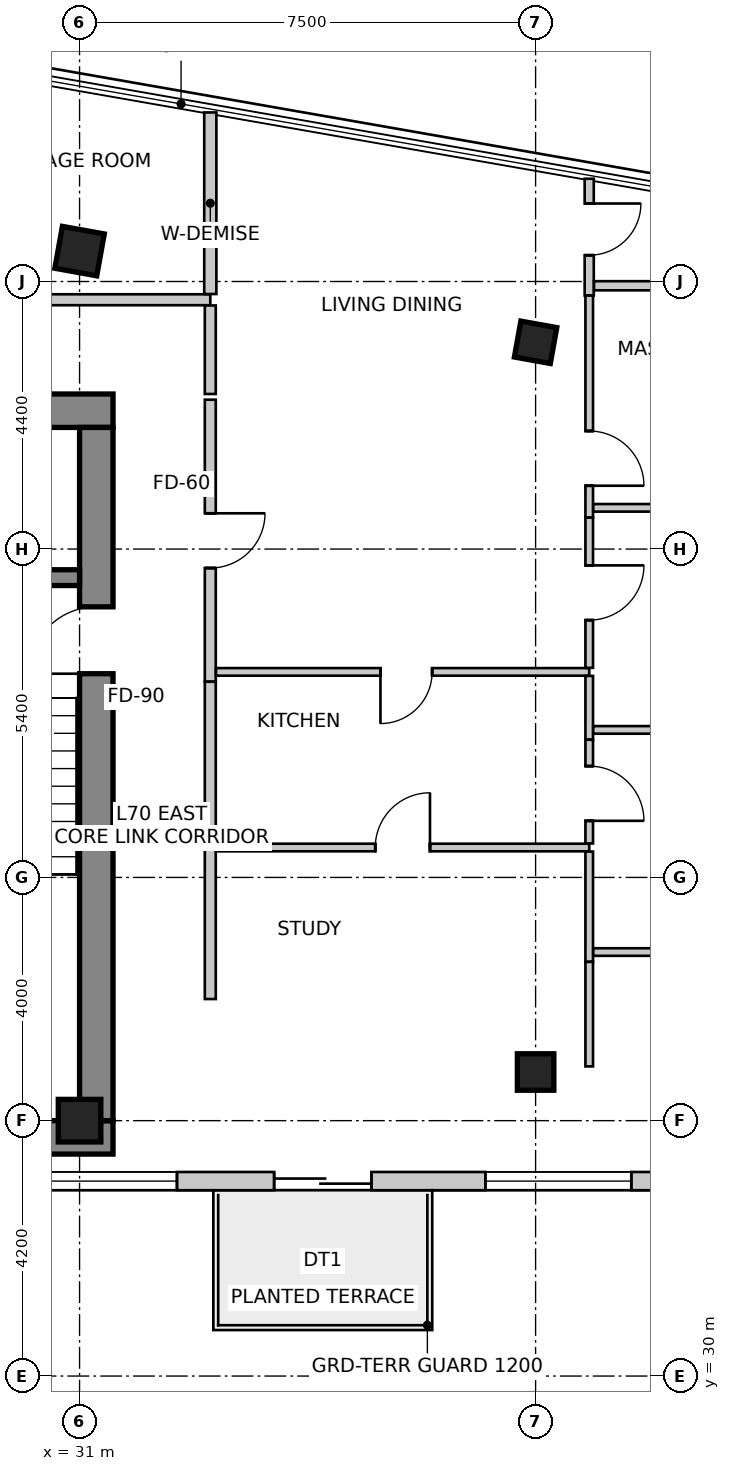
"""IFC4 building model, lengths in metres.
Left out: names, types, materials, properties, quantities, classifications, styles, units other than length and angle.
Written with IfcOpenShell. Run it as: python <this file> out.ifc"""

import sys

from ifc_helpers import new_model, si_unit, direction, frame, frame_2d, origin, origin_2d, place, context, subcontext, project, spatial, rectangle, extrude, source, transform, mapped, element, fill, save


model = new_model("IFC4")
c1 = context("Model", 3, precision=1e-05, world=origin(), true_north=direction((0.0, 1.0)))
c2 = subcontext(c1, "Body", "Model", "MODEL_VIEW")
j1 = project(units=[si_unit("LENGTHUNIT", "METRE"), si_unit("PLANEANGLEUNIT", "RADIAN")], contexts=[c1])
p1 = place(None, origin())
s1 = spatial("IfcSite", under=j1, at=p1, CompositionType="ELEMENT")
p2 = place(p1, origin())
s2 = spatial("IfcBuilding", under=s1, at=p2, CompositionType="ELEMENT")
p3 = place(p2, frame((0.0, 0.0, 274.5)))
s3 = spatial("IfcBuildingStorey", under=s2, at=p3, CompositionType="ELEMENT", Elevation=274.5)
p4 = place(p3, frame((16.05, 45.875, 0.0), z_axis=(0.0, 0.0, 1.0), x_axis=(1.0, 0.0, 0.0)))
e1 = element("IfcWall", 1, at=p4, inside=s3, PredefinedType="SHEAR", context=c2, shape_type="SweptSolid", body=[
    extrude(rectangle(XDim=15.5, YDim=0.55, at=frame_2d((7.75, 0.0))), origin(), (0.0, 0.0, 1.0), 3.6),
])
p5 = place(p3, frame((16.05, 33.925, 0.0), z_axis=(0.0, 0.0, 1.0), x_axis=(1.0, 0.0, 0.0)))
e2 = element("IfcWall", 2, at=p5, inside=s3, PredefinedType="SHEAR", context=c2, shape_type="SweptSolid", body=[
    extrude(rectangle(XDim=15.5, YDim=0.55, at=frame_2d((7.75, 0.0))), origin(), (0.0, 0.0, 1.0), 3.6),
])
m1 = source(origin(), c2, "Body", "SweptSolid", [
    extrude(rectangle(XDim=1.1, YDim=2.15, at=frame_2d((0.55, 1.075))), frame((0.0, 0.285, 0.0), z_axis=(0.0, -1.0, 0.0), x_axis=(1.0, 0.0, 0.0)), (0.0, 0.0, 1.0), 0.57),
])
p6 = place(p5, frame((9.98, 0.0, 0.0)))
e3 = element("IfcOpeningElement", 3, at=p6, cuts=e2, PredefinedType="OPENING", context=c2, shape_type="MappedRepresentation", body=[
    mapped(m1, transform((0.0, 0.0, 0.0), scale=1.0)),
])
p7 = place(p3, frame((31.275, 34.2, 0.0), z_axis=(0.0, 0.0, 1.0), x_axis=(0.0, 1.0, 0.0)))
e4 = element("IfcWall", 4, at=p7, inside=s3, PredefinedType="SHEAR", context=c2, shape_type="SweptSolid", body=[
    extrude(rectangle(XDim=11.4, YDim=0.55, at=frame_2d((5.7, 0.0))), origin(), (0.0, 0.0, 1.0), 3.6),
])
p8 = place(p7, frame((7.35, 0.0, 0.0)))
e5 = element("IfcOpeningElement", 5, at=p8, cuts=e4, PredefinedType="OPENING", context=c2, shape_type="MappedRepresentation", body=[
    mapped(m1, transform((0.0, 0.0, 0.0), scale=1.0)),
])
p9 = place(p3, frame((27.5, 43.13, 0.0), z_axis=(0.0, 0.0, 1.0), x_axis=(1.0, 0.0, 0.0)))
e6 = element("IfcWall", 6, at=p9, inside=s3, PredefinedType="SHEAR", context=c2, shape_type="SweptSolid", body=[
    extrude(rectangle(XDim=3.5, YDim=0.26, at=frame_2d((1.75, 0.0))), origin(), (0.0, 0.0, 1.0), 3.6),
])
m2 = source(origin(), c2, "Body", "SweptSolid", [
    extrude(rectangle(XDim=0.7, YDim=0.7, at=origin_2d()), origin(), (0.0, 0.0, 1.0), 3.6),
])
p10 = place(p3, frame((31.0, 48.5, 0.0), z_axis=(0.0, 0.0, 1.0), x_axis=(0.984195607969, -0.17708474032, 0.0)))
e7 = element("IfcColumn", 7, at=p10, inside=s3, PredefinedType="COLUMN", context=c2, shape_type="MappedRepresentation", body=[
    mapped(m2, transform((0.0, 0.0, 0.0), scale=1.0)),
])
m3 = source(origin(), c2, "Body", "SweptSolid", [
    extrude(rectangle(XDim=0.6, YDim=0.6, at=origin_2d()), origin(), (0.0, 0.0, 1.0), 3.6),
])
p11 = place(p3, frame((38.5, 47.0, 0.0), z_axis=(0.0, 0.0, 1.0), x_axis=(0.984195607969, -0.17708474032, 0.0)))
e8 = element("IfcColumn", 8, at=p11, inside=s3, PredefinedType="COLUMN", context=c2, shape_type="MappedRepresentation", body=[
    mapped(m3, transform((0.0, 0.0, 0.0), scale=1.0)),
])
p12 = place(p3, frame((31.0, 34.2, 0.0), z_axis=(0.0, 0.0, 1.0), x_axis=(1.0, 0.0, 0.0)))
e9 = element("IfcColumn", 9, at=p12, inside=s3, PredefinedType="COLUMN", context=c2, shape_type="MappedRepresentation", body=[
    mapped(m2, transform((0.0, 0.0, 0.0), scale=1.0)),
])
p13 = place(p3, frame((38.5, 35.0, 0.0), z_axis=(0.0, 0.0, 1.0), x_axis=(1.0, 0.0, 0.0)))
e10 = element("IfcColumn", 10, at=p13, inside=s3, PredefinedType="COLUMN", context=c2, shape_type="MappedRepresentation", body=[
    mapped(m3, transform((0.0, 0.0, 0.0), scale=1.0)),
])
p14 = place(p3, frame((28.565, 33.206, 0.0), z_axis=(0.0, 0.0, 1.0), x_axis=(1.0, 0.0, 0.0)))
e11 = element("IfcWall", 11, at=p14, inside=s3, PredefinedType="SOLIDWALL", context=c2, shape_type="SweptSolid", body=[
    extrude(rectangle(XDim=13.423, YDim=0.3, at=frame_2d((6.711, 0.0))), origin(), (0.0, 0.0, 1.0), 3.35),
])
m4 = source(origin(), c2, "Body", "SweptSolid", [
    extrude(rectangle(XDim=1.6, YDim=2.15, at=frame_2d((0.8, 1.075))), frame((0.0, 0.16, 0.0), z_axis=(0.0, -1.0, 0.0), x_axis=(1.0, 0.0, 0.0)), (0.0, 0.0, 1.0), 0.32),
])
p15 = place(p14, frame((5.635, 0.0, 0.0)))
e12 = element("IfcOpeningElement", 12, at=p15, cuts=e11, PredefinedType="OPENING", context=c2, shape_type="MappedRepresentation", body=[
    mapped(m4, transform((0.0, 0.0, 0.0), scale=1.0)),
])
m5 = source(origin(), c2, "Body", "SweptSolid", [
    extrude(rectangle(XDim=2.4, YDim=2.2, at=frame_2d((1.2, 1.1))), frame((0.0, 0.16, 0.0), z_axis=(0.0, -1.0, 0.0), x_axis=(1.0, 0.0, 0.0)), (0.0, 0.0, 1.0), 0.32),
])
p16 = place(p14, frame((1.637, 0.0, 0.85)))
e13 = element("IfcOpeningElement", 13, at=p16, cuts=e11, PredefinedType="OPENING", context=c2, shape_type="MappedRepresentation", body=[
    mapped(m5, transform((0.0, 0.0, 0.0), scale=1.0)),
])
p17 = place(p14, frame((9.109, 0.0, 0.85)))
e14 = element("IfcOpeningElement", 14, at=p17, cuts=e11, PredefinedType="OPENING", context=c2, shape_type="MappedRepresentation", body=[
    mapped(m5, transform((0.0, 0.0, 0.0), scale=1.0)),
])
p18 = place(p3, frame((28.362, 47.7, 0.0), z_axis=(0.0, 0.0, 1.0), x_axis=(1.0, 0.0, 0.0)))
e15 = element("IfcWall", 15, at=p18, inside=s3, PredefinedType="PARTITIONING", context=c2, shape_type="SweptSolid", body=[
    extrude(rectangle(XDim=4.788, YDim=0.18, at=frame_2d((2.394, 0.0))), origin(), (0.0, 0.0, 1.0), 2.879),
])
m6 = source(origin(), c2, "Body", "SweptSolid", [
    extrude(rectangle(XDim=0.85, YDim=2.15, at=frame_2d((0.425, 1.075))), frame((0.0, 0.1, 0.0), z_axis=(0.0, -1.0, 0.0), x_axis=(1.0, 0.0, 0.0)), (0.0, 0.0, 1.0), 0.2),
])
p19 = place(p18, frame((0.401, 0.0, 0.0)))
e16 = element("IfcOpeningElement", 16, at=p19, cuts=e15, PredefinedType="OPENING", context=c2, shape_type="MappedRepresentation", body=[
    mapped(m6, transform((0.0, 0.0, 0.0), scale=1.0)),
])
p20 = place(p3, frame((33.15, 47.606, 0.0), z_axis=(0.0, 0.0, 1.0), x_axis=(0.0, -1.0, 0.0)))
e17 = element("IfcWall", 17, at=p20, inside=s3, PredefinedType="PARTITIONING", context=c2, shape_type="SweptSolid", body=[
    extrude(rectangle(XDim=1.456, YDim=0.18, at=frame_2d((0.728, 0.0))), origin(), (0.0, 0.0, 1.0), 3.35),
])
p21 = place(p3, frame((33.15, 38.852, 0.0), z_axis=(0.0, 0.0, 1.0), x_axis=(0.0, -1.0, 0.0)))
e18 = element("IfcWall", 18, at=p21, inside=s3, PredefinedType="PARTITIONING", context=c2, shape_type="SweptSolid", body=[
    extrude(rectangle(XDim=2.652, YDim=0.18, at=frame_2d((1.326, 0.0))), origin(), (0.0, 0.0, 1.0), 3.35),
])
p22 = place(p3, frame((33.15, 46.056, 0.0), z_axis=(0.0, 0.0, 1.0), x_axis=(0.0, -1.0, 0.0)))
e19 = element("IfcWall", 19, at=p22, inside=s3, PredefinedType="PARTITIONING", context=c2, shape_type="SweptSolid", body=[
    extrude(rectangle(XDim=4.636, YDim=0.18, at=frame_2d((2.318, 0.0))), origin(), (0.0, 0.0, 1.0), 2.879),
])
m7 = source(origin(), c2, "Body", "SweptSolid", [
    extrude(rectangle(XDim=0.9, YDim=2.15, at=frame_2d((0.45, 1.075))), frame((0.0, 0.1, 0.0), z_axis=(0.0, -1.0, 0.0), x_axis=(1.0, 0.0, 0.0)), (0.0, 0.0, 1.0), 0.2),
])
p23 = place(p22, frame((1.868, 0.0, 0.0)))
e20 = element("IfcOpeningElement", 20, at=p23, cuts=e19, PredefinedType="OPENING", context=c2, shape_type="MappedRepresentation", body=[
    mapped(m7, transform((0.0, 0.0, 0.0), scale=1.0)),
])
p24 = place(p3, frame((33.15, 41.418, 0.0), z_axis=(0.0, 0.0, 1.0), x_axis=(0.0, -1.0, 0.0)))
e21 = element("IfcWall", 21, at=p24, inside=s3, PredefinedType="PARTITIONING", context=c2, shape_type="SweptSolid", body=[
    extrude(rectangle(XDim=2.564, YDim=0.18, at=frame_2d((1.282, 0.0))), origin(), (0.0, 0.0, 1.0), 3.35),
])
p25 = place(p3, frame((33.15, 50.78, 0.0), z_axis=(0.0, 0.0, 1.0), x_axis=(0.0, -1.0, 0.0)))
e22 = element("IfcWall", 22, at=p25, inside=s3, PredefinedType="PARTITIONING", context=c2, shape_type="SweptSolid", body=[
    extrude(rectangle(XDim=2.986, YDim=0.2, at=frame_2d((1.493, 0.0))), origin(), (0.0, 0.0, 1.0), 2.642),
])
p26 = place(p3, frame((33.244, 38.692, 0.0), z_axis=(0.0, 0.0, 1.0), x_axis=(1.0, 0.0, 0.0)))
e23 = element("IfcWall", 23, at=p26, inside=s3, PredefinedType="PARTITIONING", context=c2, shape_type="SweptSolid", body=[
    extrude(rectangle(XDim=6.138, YDim=0.125, at=frame_2d((3.069, 0.0))), origin(), (0.0, 0.0, 1.0), 2.979),
])
m8 = source(origin(), c2, "Body", "SweptSolid", [
    extrude(rectangle(XDim=0.9, YDim=2.15, at=frame_2d((0.45, 1.075))), frame((0.0, 0.073, 0.0), z_axis=(0.0, -1.0, 0.0), x_axis=(1.0, 0.0, 0.0)), (0.0, 0.0, 1.0), 0.145),
])
p27 = place(p26, frame((2.619, 0.0, 0.0)))
e24 = element("IfcOpeningElement", 24, at=p27, cuts=e23, PredefinedType="OPENING", context=c2, shape_type="MappedRepresentation", body=[
    mapped(m8, transform((0.0, 0.0, 0.0), scale=1.0)),
])
p28 = place(p3, frame((39.382, 38.625, 0.0), z_axis=(0.0, 0.0, 1.0), x_axis=(0.0, -1.0, 0.0)))
e25 = element("IfcWall", 25, at=p28, inside=s3, PredefinedType="PARTITIONING", context=c2, shape_type="SweptSolid", body=[
    extrude(rectangle(XDim=1.812, YDim=0.125, at=frame_2d((0.906, 0.0))), origin(), (0.0, 0.0, 1.0), 3.35),
])
p29 = place(p3, frame((39.382, 36.811, 0.0), z_axis=(0.0, 0.0, 1.0), x_axis=(0.0, -1.0, 0.0)))
e26 = element("IfcWall", 26, at=p29, inside=s3, PredefinedType="PARTITIONING", context=c2, shape_type="SweptSolid", body=[
    extrude(rectangle(XDim=1.719, YDim=0.125, at=frame_2d((0.859, 0.0))), origin(), (0.0, 0.0, 1.0), 3.35),
])
p30 = place(p3, frame((39.382, 41.58, 0.0), z_axis=(0.0, 0.0, 1.0), x_axis=(-1.0, 0.0, 0.0)))
e27 = element("IfcWall", 27, at=p30, inside=s3, PredefinedType="PARTITIONING", context=c2, shape_type="SweptSolid", body=[
    extrude(rectangle(XDim=6.138, YDim=0.125, at=frame_2d((3.069, 0.0))), origin(), (0.0, 0.0, 1.0), 2.979),
])
m9 = source(origin(), c2, "Body", "SweptSolid", [
    extrude(rectangle(XDim=0.85, YDim=2.15, at=frame_2d((0.425, 1.075))), frame((0.0, 0.073, 0.0), z_axis=(0.0, -1.0, 0.0), x_axis=(1.0, 0.0, 0.0)), (0.0, 0.0, 1.0), 0.145),
])
p31 = place(p30, frame((2.583, 0.0, 0.0)))
e28 = element("IfcOpeningElement", 28, at=p31, cuts=e27, PredefinedType="OPENING", context=c2, shape_type="MappedRepresentation", body=[
    mapped(m9, transform((0.0, 0.0, 0.0), scale=1.0)),
])
p32 = place(p3, frame((39.382, 49.69, 0.0), z_axis=(0.0, 0.0, 1.0), x_axis=(0.0, -1.0, 0.0)))
e29 = element("IfcWall", 29, at=p32, inside=s3, PredefinedType="PARTITIONING", context=c2, shape_type="SweptSolid", body=[
    extrude(rectangle(XDim=1.92, YDim=0.15, at=frame_2d((0.96, 0.0))), origin(), (0.0, 0.0, 1.0), 3.35),
])
m10 = source(origin(), c2, "Body", "SweptSolid", [
    extrude(rectangle(XDim=0.85, YDim=2.15, at=frame_2d((0.425, 1.075))), frame((0.0, 0.085, 0.0), z_axis=(0.0, -1.0, 0.0), x_axis=(1.0, 0.0, 0.0)), (0.0, 0.0, 1.0), 0.17),
])
p33 = place(p32, frame((0.407, 0.0, 0.0)))
e30 = element("IfcOpeningElement", 30, at=p33, cuts=e29, PredefinedType="OPENING", context=c2, shape_type="MappedRepresentation", body=[
    mapped(m10, transform((0.0, 0.0, 0.0), scale=1.0)),
])
p34 = place(p3, frame((39.382, 47.768, 0.0), z_axis=(0.0, 0.0, 1.0), x_axis=(0.0, -1.0, 0.0)))
e31 = element("IfcWall", 31, at=p34, inside=s3, PredefinedType="PARTITIONING", context=c2, shape_type="SweptSolid", body=[
    extrude(rectangle(XDim=3.65, YDim=0.125, at=frame_2d((1.825, 0.0))), origin(), (0.0, 0.0, 1.0), 3.35),
])
p35 = place(p34, frame((2.227, 0.0, 0.0)))
e32 = element("IfcOpeningElement", 32, at=p35, cuts=e31, PredefinedType="OPENING", context=c2, shape_type="MappedRepresentation", body=[
    mapped(m8, transform((0.0, 0.0, 0.0), scale=1.0)),
])
p36 = place(p3, frame((39.382, 44.116, 0.0), z_axis=(0.0, 0.0, 1.0), x_axis=(0.0, -1.0, 0.0)))
e33 = element("IfcWall", 33, at=p36, inside=s3, PredefinedType="PARTITIONING", context=c2, shape_type="SweptSolid", body=[
    extrude(rectangle(XDim=2.469, YDim=0.125, at=frame_2d((1.235, 0.0))), origin(), (0.0, 0.0, 1.0), 3.35),
])
p37 = place(p36, frame((0.785, 0.0, 0.0)))
e34 = element("IfcOpeningElement", 34, at=p37, cuts=e33, PredefinedType="OPENING", context=c2, shape_type="MappedRepresentation", body=[
    mapped(m8, transform((0.0, 0.0, 0.0), scale=1.0)),
])
p38 = place(p3, frame((39.382, 41.513, 0.0), z_axis=(0.0, 0.0, 1.0), x_axis=(0.0, -1.0, 0.0)))
e35 = element("IfcWall", 35, at=p38, inside=s3, PredefinedType="PARTITIONING", context=c2, shape_type="SweptSolid", body=[
    extrude(rectangle(XDim=1.047, YDim=0.125, at=frame_2d((0.524, 0.0))), origin(), (0.0, 0.0, 1.0), 3.35),
])
p39 = place(p3, frame((39.382, 40.464, 0.0), z_axis=(0.0, 0.0, 1.0), x_axis=(0.0, -1.0, 0.0)))
e36 = element("IfcWall", 36, at=p39, inside=s3, PredefinedType="PARTITIONING", context=c2, shape_type="SweptSolid", body=[
    extrude(rectangle(XDim=1.706, YDim=0.125, at=frame_2d((0.853, 0.0))), origin(), (0.0, 0.0, 1.0), 3.35),
])
p40 = place(p39, frame((0.433, 0.0, 0.0)))
e37 = element("IfcOpeningElement", 37, at=p40, cuts=e36, PredefinedType="OPENING", context=c2, shape_type="MappedRepresentation", body=[
    mapped(m8, transform((0.0, 0.0, 0.0), scale=1.0)),
])
p41 = place(p3, frame((44.351, 47.93, 0.0), z_axis=(0.0, 0.0, 1.0), x_axis=(-1.0, 0.0, 0.0)))
e38 = element("IfcWall", 38, at=p41, inside=s3, PredefinedType="PARTITIONING", context=c2, shape_type="SweptSolid", body=[
    extrude(rectangle(XDim=4.89, YDim=0.15, at=frame_2d((2.445, 0.0))), origin(), (0.0, 0.0, 1.0), 3.35),
])
for number, where, z_axis, x_axis in (
    (39, (45.135, 44.278, 0.0), (0.0, 0.0, 1.0), (-1.0, 0.0, 0.0)),
    (40, (45.135, 40.626, 0.0), (0.0, 0.0, 1.0), (-1.0, 0.0, 0.0)),
):
    element("IfcWall", number, at=place(p3, frame(where, z_axis=z_axis, x_axis=x_axis)), inside=s3, PredefinedType="PARTITIONING", context=c2, shape_type="SweptSolid", body=[
        extrude(rectangle(XDim=5.687, YDim=0.125, at=frame_2d((2.843, 0.0))), origin(), (0.0, 0.0, 1.0), 3.35),
    ])
p42 = place(p3, frame((45.135, 36.973, 0.0), z_axis=(0.0, 0.0, 1.0), x_axis=(-1.0, 0.0, 0.0)))
e41 = element("IfcWall", 41, at=p42, inside=s3, PredefinedType="PARTITIONING", context=c2, shape_type="SweptSolid", body=[
    extrude(rectangle(XDim=5.687, YDim=0.125, at=frame_2d((2.843, 0.0))), origin(), (0.0, 0.0, 1.0), 3.35),
])
p43 = place(p42, frame((2.333, 0.0, 0.0)))
e42 = element("IfcOpeningElement", 42, at=p43, cuts=e41, PredefinedType="OPENING", context=c2, shape_type="MappedRepresentation", body=[
    mapped(m8, transform((0.0, 0.0, 0.0), scale=1.0)),
])
m11 = source(origin(), c2, "Body", "SweptSolid", [
    extrude(rectangle(XDim=1.6, YDim=2.15, at=frame_2d((0.8, 1.075))), frame((0.0, 0.025, 0.0), z_axis=(0.0, -1.0, 0.0), x_axis=(1.0, 0.0, 0.0)), (0.0, 0.0, 1.0), 0.05),
])
p44 = place(p15, origin())
e43 = element("IfcDoor", 43, at=p44, inside=s3, OperationType="DOUBLE_DOOR_SLIDING", PredefinedType="DOOR", context=c2, shape_type="MappedRepresentation", body=[
    mapped(m11, transform((0.0, 0.0, 0.0), scale=1.0)),
])
fill(e12, e43)
m12 = source(origin(), c2, "Body", "SweptSolid", [
    extrude(rectangle(XDim=2.4, YDim=2.2, at=frame_2d((1.2, 1.1))), frame((0.0, -0.015, 0.0), z_axis=(0.0, -1.0, 0.0), x_axis=(1.0, 0.0, 0.0)), (0.0, 0.0, 1.0), 0.06),
])
p45 = place(p16, origin())
e44 = element("IfcWindow", 44, at=p45, inside=s3, PartitioningType="SINGLE_PANEL", PredefinedType="WINDOW", context=c2, shape_type="MappedRepresentation", body=[
    mapped(m12, transform((0.0, 0.0, 0.0), scale=1.0)),
])
fill(e13, e44)
p46 = place(p17, origin())
e45 = element("IfcWindow", 45, at=p46, inside=s3, PartitioningType="SINGLE_PANEL", PredefinedType="WINDOW", context=c2, shape_type="MappedRepresentation", body=[
    mapped(m12, transform((0.0, 0.0, 0.0), scale=1.0)),
])
fill(e14, e45)
m13 = source(origin(), c2, "Body", "SweptSolid", [
    extrude(rectangle(XDim=1.1, YDim=2.15, at=frame_2d((0.55, 1.075))), frame((0.0, 0.025, 0.0), z_axis=(0.0, -1.0, 0.0), x_axis=(1.0, 0.0, 0.0)), (0.0, 0.0, 1.0), 0.05),
])
p47 = place(p8, origin())
e46 = element("IfcDoor", 46, at=p47, inside=s3, OperationType="SINGLE_SWING_LEFT", PredefinedType="DOOR", context=c2, shape_type="MappedRepresentation", body=[
    mapped(m13, transform((0.0, 0.0, 0.0), scale=1.0)),
])
fill(e5, e46)
m14 = source(origin(), c2, "Body", "SweptSolid", [
    extrude(rectangle(XDim=0.9, YDim=2.15, at=frame_2d((0.45, 1.075))), frame((0.0, 0.025, 0.0), z_axis=(0.0, -1.0, 0.0), x_axis=(1.0, 0.0, 0.0)), (0.0, 0.0, 1.0), 0.05),
])
p48 = place(p27, origin())
e47 = element("IfcDoor", 47, at=p48, inside=s3, OperationType="SINGLE_SWING_RIGHT", PredefinedType="DOOR", context=c2, shape_type="MappedRepresentation", body=[
    mapped(m14, transform((0.0, 0.0, 0.0), scale=1.0)),
])
fill(e24, e47)
m15 = source(origin(), c2, "Body", "SweptSolid", [
    extrude(rectangle(XDim=0.9, YDim=2.15, at=frame_2d((0.45, 1.075))), frame((0.0, 0.025, 0.0), z_axis=(0.0, -1.0, 0.0), x_axis=(1.0, 0.0, 0.0)), (0.0, 0.0, 1.0), 0.05),
])
p49 = place(p23, origin())
e48 = element("IfcDoor", 48, at=p49, inside=s3, OperationType="SINGLE_SWING_LEFT", PredefinedType="DOOR", context=c2, shape_type="MappedRepresentation", body=[
    mapped(m15, transform((0.0, 0.0, 0.0), scale=1.0)),
])
fill(e20, e48)
m16 = source(origin(), c2, "Body", "SweptSolid", [
    extrude(rectangle(XDim=0.85, YDim=2.15, at=frame_2d((0.425, 1.075))), frame((0.0, 0.025, 0.0), z_axis=(0.0, -1.0, 0.0), x_axis=(1.0, 0.0, 0.0)), (0.0, 0.0, 1.0), 0.05),
])
p50 = place(p31, origin())
e49 = element("IfcDoor", 49, at=p50, inside=s3, OperationType="SINGLE_SWING_RIGHT", PredefinedType="DOOR", context=c2, shape_type="MappedRepresentation", body=[
    mapped(m16, transform((0.0, 0.0, 0.0), scale=1.0)),
])
fill(e28, e49)
p51 = place(p33, origin())
e50 = element("IfcDoor", 50, at=p51, inside=s3, OperationType="SINGLE_SWING_LEFT", PredefinedType="DOOR", context=c2, shape_type="MappedRepresentation", body=[
    mapped(m16, transform((0.0, 0.0, 0.0), scale=1.0)),
])
fill(e30, e50)
p52 = place(p35, origin())
e51 = element("IfcDoor", 51, at=p52, inside=s3, OperationType="SINGLE_SWING_RIGHT", PredefinedType="DOOR", context=c2, shape_type="MappedRepresentation", body=[
    mapped(m14, transform((0.0, 0.0, 0.0), scale=1.0)),
])
fill(e32, e51)
p53 = place(p37, origin())
e52 = element("IfcDoor", 52, at=p53, inside=s3, OperationType="SINGLE_SWING_LEFT", PredefinedType="DOOR", context=c2, shape_type="MappedRepresentation", body=[
    mapped(m14, transform((0.0, 0.0, 0.0), scale=1.0)),
])
fill(e34, e52)
p54 = place(p40, origin())
e53 = element("IfcDoor", 53, at=p54, inside=s3, OperationType="SINGLE_SWING_RIGHT", PredefinedType="DOOR", context=c2, shape_type="MappedRepresentation", body=[
    mapped(m14, transform((0.0, 0.0, 0.0), scale=1.0)),
])
fill(e37, e53)
save(model, sys.argv[1])
